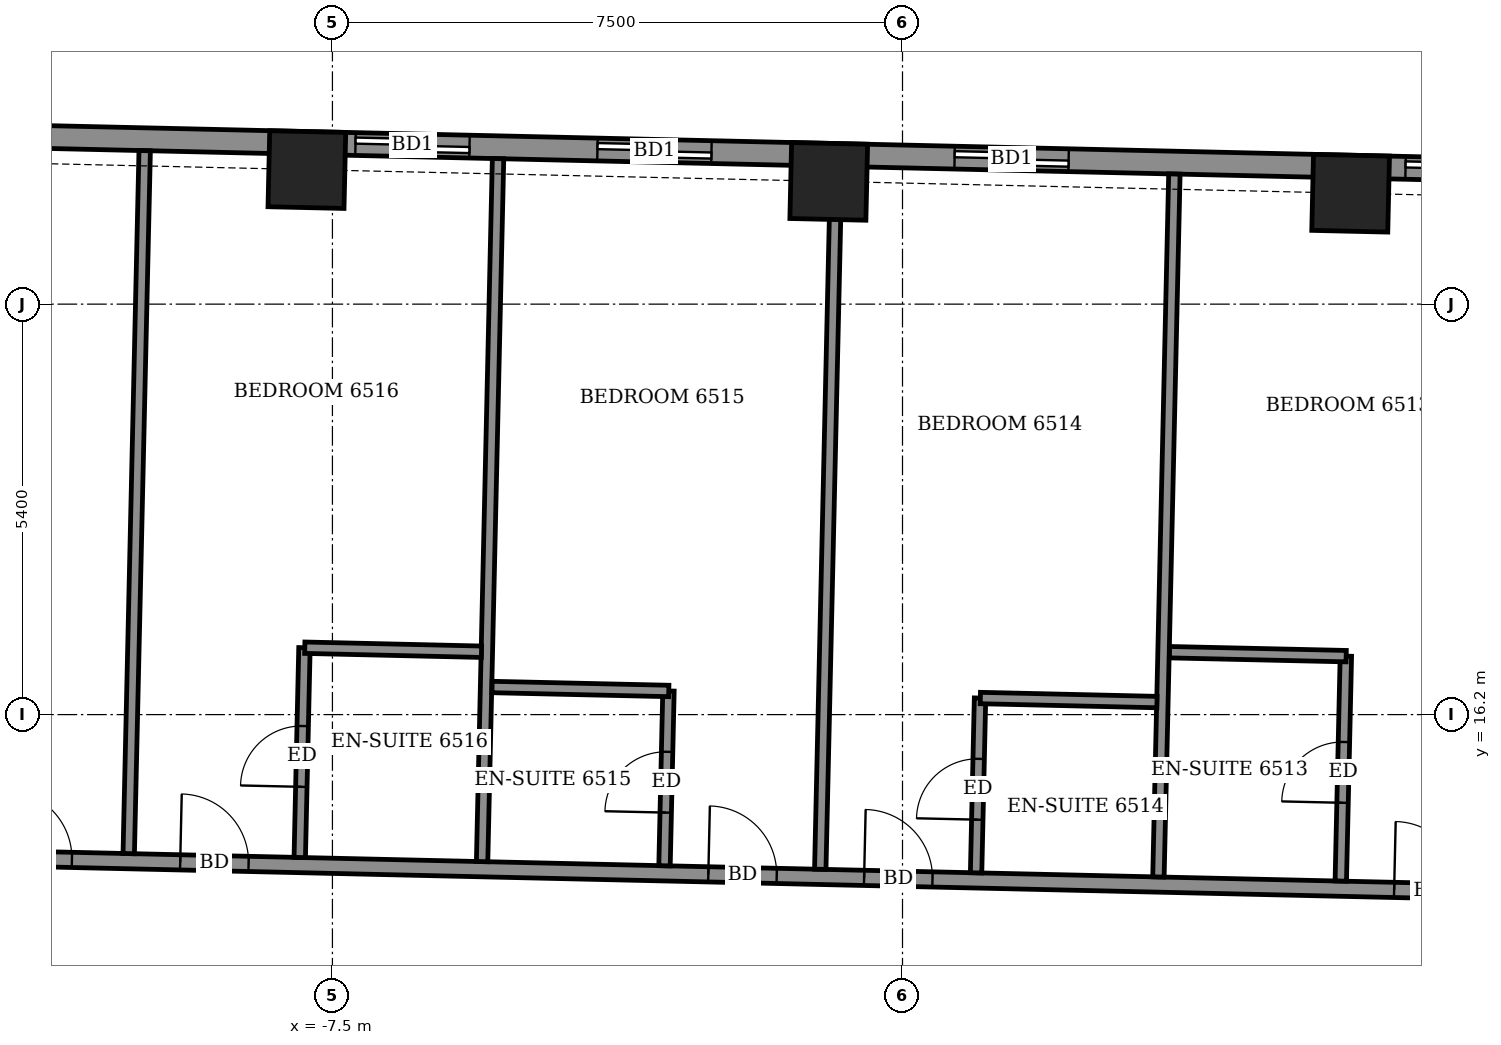
"""IFC4 building model, lengths in metres.
Left out: names, types, materials, properties, quantities, classifications, styles, units other than length and angle.
Written with IfcOpenShell. Run it as: python <this file> out.ifc"""

import sys

from ifc_helpers import new_model, si_unit, direction, frame, frame_2d, origin, origin_2d, place, context, subcontext, project, spatial, rectangle, extrude, element, fill, save


model = new_model("IFC4")
c1 = context("Model", 3, precision=1e-05, world=origin(), true_north=direction((0.0, 1.0)))
c2 = subcontext(c1, "Body", "Model", "MODEL_VIEW")
j1 = project(units=[si_unit("LENGTHUNIT", "METRE"), si_unit("PLANEANGLEUNIT", "RADIAN")], contexts=[c1])
p1 = place(None, origin())
s1 = spatial("IfcSite", under=j1, at=p1, CompositionType="ELEMENT")
p2 = place(p1, origin())
s2 = spatial("IfcBuilding", under=s1, at=p2, CompositionType="ELEMENT")
p3 = place(p2, frame((0.0, 0.0, 257.3)))
s3 = spatial("IfcBuildingStorey", under=s2, at=p3, CompositionType="ELEMENT", Elevation=257.3)
for number, where, z_axis, x_axis in (
    (1, (5.896, 23.059, -0.55), (0.0, 0.0, 1.0), (-1.0, 0.023, 0.0)),
    (2, (-0.97, 23.215, -0.55), (0.0, 0.0, 1.0), (-1.0, 0.023, 0.0)),
    (3, (-7.836, 23.37, -0.55), (0.0, 0.0, 1.0), (-1.0, 0.023, 0.0)),
):
    element("IfcColumn", number, at=place(p3, frame(where, z_axis=z_axis, x_axis=x_axis)), inside=s3, PredefinedType="COLUMN", context=c2, shape_type="SweptSolid", body=[
        extrude(rectangle(XDim=1.0, YDim=1.0, at=origin_2d()), origin(), (0.0, 0.0, 1.0), 3.6),
    ])
p4 = place(p3, frame((26.35, 22.945, 0.0), z_axis=(0.0, 0.0, 1.0), x_axis=(-0.999742523712, 0.022691105788, 0.0)))
e4 = element("IfcWall", 4, at=p4, inside=s3, PredefinedType="SOLIDWALL", context=c2, shape_type="SweptSolid", body=[
    extrude(rectangle(XDim=47.771, YDim=0.3, at=frame_2d((23.886, 0.0))), origin(), (0.0, 0.0, 1.0), 2.55),
])
p5 = place(p4, frame((1.578, 0.0, 0.0)))
e5 = element("IfcOpeningElement", 5, at=p5, cuts=e4, PredefinedType="OPENING", context=c2, shape_type="SweptSolid", body=[
    extrude(rectangle(XDim=1.5, YDim=2.4, at=frame_2d((0.75, 1.2))), frame((0.0, 0.16, 0.0), z_axis=(0.0, -1.0, 0.0), x_axis=(1.0, 0.0, 0.0)), (0.0, 0.0, 1.0), 0.32),
])
p6 = place(p4, frame((4.545, 0.0, 0.0)))
e6 = element("IfcOpeningElement", 6, at=p6, cuts=e4, PredefinedType="OPENING", context=c2, shape_type="SweptSolid", body=[
    extrude(rectangle(XDim=1.5, YDim=2.4, at=frame_2d((0.75, 1.2))), frame((0.0, 0.16, 0.0), z_axis=(0.0, -1.0, 0.0), x_axis=(1.0, 0.0, 0.0)), (0.0, 0.0, 1.0), 0.32),
])
p7 = place(p4, frame((10.354, 0.0, 0.0)))
e7 = element("IfcOpeningElement", 7, at=p7, cuts=e4, PredefinedType="OPENING", context=c2, shape_type="SweptSolid", body=[
    extrude(rectangle(XDim=1.5, YDim=2.4, at=frame_2d((0.75, 1.2))), frame((0.0, 0.16, 0.0), z_axis=(0.0, -1.0, 0.0), x_axis=(1.0, 0.0, 0.0)), (0.0, 0.0, 1.0), 0.32),
])
p8 = place(p4, frame((15.204, 0.0, 0.0)))
e8 = element("IfcOpeningElement", 8, at=p8, cuts=e4, PredefinedType="OPENING", context=c2, shape_type="SweptSolid", body=[
    extrude(rectangle(XDim=1.5, YDim=2.4, at=frame_2d((0.75, 1.2))), frame((0.0, 0.16, 0.0), z_axis=(0.0, -1.0, 0.0), x_axis=(1.0, 0.0, 0.0)), (0.0, 0.0, 1.0), 0.32),
])
p9 = place(p4, frame((18.537, 0.0, 0.0)))
e9 = element("IfcOpeningElement", 9, at=p9, cuts=e4, PredefinedType="OPENING", context=c2, shape_type="SweptSolid", body=[
    extrude(rectangle(XDim=1.2, YDim=2.4, at=frame_2d((0.6, 1.2))), frame((0.0, 0.16, 0.0), z_axis=(0.0, -1.0, 0.0), x_axis=(1.0, 0.0, 0.0)), (0.0, 0.0, 1.0), 0.32),
])
p10 = place(p4, frame((24.171, 0.0, 0.0)))
e10 = element("IfcOpeningElement", 10, at=p10, cuts=e4, PredefinedType="OPENING", context=c2, shape_type="SweptSolid", body=[
    extrude(rectangle(XDim=1.5, YDim=2.4, at=frame_2d((0.75, 1.2))), frame((0.0, 0.16, 0.0), z_axis=(0.0, -1.0, 0.0), x_axis=(1.0, 0.0, 0.0)), (0.0, 0.0, 1.0), 0.32),
])
p11 = place(p4, frame((28.871, 0.0, 0.0)))
e11 = element("IfcOpeningElement", 11, at=p11, cuts=e4, PredefinedType="OPENING", context=c2, shape_type="SweptSolid", body=[
    extrude(rectangle(XDim=1.5, YDim=2.4, at=frame_2d((0.75, 1.2))), frame((0.0, 0.16, 0.0), z_axis=(0.0, -1.0, 0.0), x_axis=(1.0, 0.0, 0.0)), (0.0, 0.0, 1.0), 0.32),
])
p12 = place(p4, frame((32.055, 0.0, 0.0)))
e12 = element("IfcOpeningElement", 12, at=p12, cuts=e4, PredefinedType="OPENING", context=c2, shape_type="SweptSolid", body=[
    extrude(rectangle(XDim=1.5, YDim=2.4, at=frame_2d((0.75, 1.2))), frame((0.0, 0.16, 0.0), z_axis=(0.0, -1.0, 0.0), x_axis=(1.0, 0.0, 0.0)), (0.0, 0.0, 1.0), 0.32),
])
p13 = place(p4, frame((37.813, 0.0, 0.0)))
e13 = element("IfcOpeningElement", 13, at=p13, cuts=e4, PredefinedType="OPENING", context=c2, shape_type="SweptSolid", body=[
    extrude(rectangle(XDim=1.5, YDim=2.4, at=frame_2d((0.75, 1.2))), frame((0.0, 0.16, 0.0), z_axis=(0.0, -1.0, 0.0), x_axis=(1.0, 0.0, 0.0)), (0.0, 0.0, 1.0), 0.32),
])
p14 = place(p4, frame((43.052, 0.0, 0.9)))
e14 = element("IfcOpeningElement", 14, at=p14, cuts=e4, PredefinedType="OPENING", context=c2, shape_type="SweptSolid", body=[
    extrude(rectangle(XDim=2.4, YDim=1.5, at=frame_2d((1.2, 0.75))), frame((0.0, 0.16, 0.0), z_axis=(0.0, -1.0, 0.0), x_axis=(1.0, 0.0, 0.0)), (0.0, 0.0, 1.0), 0.32),
])
p15 = place(p3, frame((-24.474, 14.596, 0.0), z_axis=(0.0, 0.0, 1.0), x_axis=(0.999742424031, -0.022695497208, 0.0)))
e15 = element("IfcWall", 15, at=p15, inside=s3, PredefinedType="PARTITIONING", context=c2, shape_type="SweptSolid", body=[
    extrude(rectangle(XDim=52.872, YDim=0.2, at=frame_2d((26.436, 0.0))), origin(), (0.0, 0.0, 1.0), 3.05),
])
p16 = place(p15, frame((51.336, 0.0, 0.0)))
e16 = element("IfcOpeningElement", 16, at=p16, cuts=e15, PredefinedType="OPENING", context=c2, shape_type="SweptSolid", body=[
    extrude(rectangle(XDim=1.0, YDim=2.1, at=frame_2d((0.5, 1.05))), frame((0.0, 0.11, 0.0), z_axis=(0.0, -1.0, 0.0), x_axis=(1.0, 0.0, 0.0)), (0.0, 0.0, 1.0), 0.22),
])
p17 = place(p15, frame((47.25, 0.0, 0.0)))
e17 = element("IfcOpeningElement", 17, at=p17, cuts=e15, PredefinedType="OPENING", context=c2, shape_type="SweptSolid", body=[
    extrude(rectangle(XDim=0.9, YDim=2.1, at=frame_2d((0.45, 1.05))), frame((0.0, 0.11, 0.0), z_axis=(0.0, -1.0, 0.0), x_axis=(1.0, 0.0, 0.0)), (0.0, 0.0, 1.0), 0.22),
])
p18 = place(p15, frame((42.475, 0.0, 0.0)))
e18 = element("IfcOpeningElement", 18, at=p18, cuts=e15, PredefinedType="OPENING", context=c2, shape_type="SweptSolid", body=[
    extrude(rectangle(XDim=0.9, YDim=2.1, at=frame_2d((0.45, 1.05))), frame((0.0, 0.11, 0.0), z_axis=(0.0, -1.0, 0.0), x_axis=(1.0, 0.0, 0.0)), (0.0, 0.0, 1.0), 0.22),
])
p19 = place(p15, frame((40.15, 0.0, 0.0)))
e19 = element("IfcOpeningElement", 19, at=p19, cuts=e15, PredefinedType="OPENING", context=c2, shape_type="SweptSolid", body=[
    extrude(rectangle(XDim=0.9, YDim=2.1, at=frame_2d((0.45, 1.05))), frame((0.0, 0.11, 0.0), z_axis=(0.0, -1.0, 0.0), x_axis=(1.0, 0.0, 0.0)), (0.0, 0.0, 1.0), 0.22),
])
p20 = place(p15, frame((33.15, 0.0, 0.0)))
e20 = element("IfcOpeningElement", 20, at=p20, cuts=e15, PredefinedType="OPENING", context=c2, shape_type="SweptSolid", body=[
    extrude(rectangle(XDim=0.9, YDim=2.1, at=frame_2d((0.45, 1.05))), frame((0.0, 0.11, 0.0), z_axis=(0.0, -1.0, 0.0), x_axis=(1.0, 0.0, 0.0)), (0.0, 0.0, 1.0), 0.22),
])
p21 = place(p15, frame((30.95, 0.0, 0.0)))
e21 = element("IfcOpeningElement", 21, at=p21, cuts=e15, PredefinedType="OPENING", context=c2, shape_type="SweptSolid", body=[
    extrude(rectangle(XDim=0.9, YDim=2.1, at=frame_2d((0.45, 1.05))), frame((0.0, 0.11, 0.0), z_axis=(0.0, -1.0, 0.0), x_axis=(1.0, 0.0, 0.0)), (0.0, 0.0, 1.0), 0.22),
])
p22 = place(p15, frame((23.975, 0.0, 0.0)))
e22 = element("IfcOpeningElement", 22, at=p22, cuts=e15, PredefinedType="OPENING", context=c2, shape_type="SweptSolid", body=[
    extrude(rectangle(XDim=0.9, YDim=2.1, at=frame_2d((0.45, 1.05))), frame((0.0, 0.11, 0.0), z_axis=(0.0, -1.0, 0.0), x_axis=(1.0, 0.0, 0.0)), (0.0, 0.0, 1.0), 0.22),
])
p23 = place(p15, frame((21.925, 0.0, 0.0)))
e23 = element("IfcOpeningElement", 23, at=p23, cuts=e15, PredefinedType="OPENING", context=c2, shape_type="SweptSolid", body=[
    extrude(rectangle(XDim=0.9, YDim=2.1, at=frame_2d((0.45, 1.05))), frame((0.0, 0.11, 0.0), z_axis=(0.0, -1.0, 0.0), x_axis=(1.0, 0.0, 0.0)), (0.0, 0.0, 1.0), 0.22),
])
p24 = place(p15, frame((14.975, 0.0, 0.0)))
e24 = element("IfcOpeningElement", 24, at=p24, cuts=e15, PredefinedType="OPENING", context=c2, shape_type="SweptSolid", body=[
    extrude(rectangle(XDim=0.9, YDim=2.1, at=frame_2d((0.45, 1.05))), frame((0.0, 0.11, 0.0), z_axis=(0.0, -1.0, 0.0), x_axis=(1.0, 0.0, 0.0)), (0.0, 0.0, 1.0), 0.22),
])
p25 = place(p15, frame((12.65, 0.0, 0.0)))
e25 = element("IfcOpeningElement", 25, at=p25, cuts=e15, PredefinedType="OPENING", context=c2, shape_type="SweptSolid", body=[
    extrude(rectangle(XDim=0.9, YDim=2.1, at=frame_2d((0.45, 1.05))), frame((0.0, 0.11, 0.0), z_axis=(0.0, -1.0, 0.0), x_axis=(1.0, 0.0, 0.0)), (0.0, 0.0, 1.0), 0.22),
])
p26 = place(p15, frame((2.0, 0.0, 0.0)))
e26 = element("IfcOpeningElement", 26, at=p26, cuts=e15, PredefinedType="OPENING", context=c2, shape_type="SweptSolid", body=[
    extrude(rectangle(XDim=1.0, YDim=2.1, at=frame_2d((0.5, 1.05))), frame((0.0, 0.11, 0.0), z_axis=(0.0, -1.0, 0.0), x_axis=(1.0, 0.0, 0.0)), (0.0, 0.0, 1.0), 0.22),
])
p27 = place(p15, frame((7.75, 0.0, 0.0)))
e27 = element("IfcOpeningElement", 27, at=p27, cuts=e15, PredefinedType="OPENING", context=c2, shape_type="SweptSolid", body=[
    extrude(rectangle(XDim=0.9, YDim=2.1, at=frame_2d((0.45, 1.05))), frame((0.0, 0.11, 0.0), z_axis=(0.0, -1.0, 0.0), x_axis=(1.0, 0.0, 0.0)), (0.0, 0.0, 1.0), 0.22),
])
p28 = place(p3, frame((-10.18, 14.371, 0.0), z_axis=(0.0, 0.0, 1.0), x_axis=(0.022698023584, 0.999742366675, 0.0)))
e28 = element("IfcWall", 28, at=p28, inside=s3, PredefinedType="PARTITIONING", context=c2, shape_type="SweptSolid", body=[
    extrude(rectangle(XDim=9.25, YDim=0.15, at=frame_2d((4.625, 0.0))), origin(), (0.0, 0.0, 1.0), 2.55),
])
p29 = place(p3, frame((-7.93, 14.32, 0.0), z_axis=(0.0, 0.0, 1.0), x_axis=(0.022462265691, 0.99974769148, 0.0)))
e29 = element("IfcWall", 29, at=p29, inside=s3, PredefinedType="PARTITIONING", context=c2, shape_type="SweptSolid", body=[
    extrude(rectangle(XDim=2.761, YDim=0.15, at=frame_2d((1.38, 0.0))), origin(), (0.0, 0.0, 1.0), 3.05),
])
p30 = place(p29, frame((0.93, 0.0, 0.0)))
e30 = element("IfcOpeningElement", 30, at=p30, cuts=e29, PredefinedType="OPENING", context=c2, shape_type="SweptSolid", body=[
    extrude(rectangle(XDim=0.8, YDim=2.1, at=frame_2d((0.4, 1.05))), frame((0.0, 0.085, 0.0), z_axis=(0.0, -1.0, 0.0), x_axis=(1.0, 0.0, 0.0)), (0.0, 0.0, 1.0), 0.17),
])
p31 = place(p3, frame((-5.531, 14.266, 0.0), z_axis=(0.0, 0.0, 1.0), x_axis=(0.022698023584, 0.999742366675, 0.0)))
e31 = element("IfcWall", 31, at=p31, inside=s3, PredefinedType="PARTITIONING", context=c2, shape_type="SweptSolid", body=[
    extrude(rectangle(XDim=9.25, YDim=0.15, at=frame_2d((4.625, 0.0))), origin(), (0.0, 0.0, 1.0), 2.55),
])
p32 = place(p3, frame((-3.131, 14.211, 0.0), z_axis=(0.0, 0.0, 1.0), x_axis=(0.022603288534, 0.999744513037, 0.0)))
e32 = element("IfcWall", 32, at=p32, inside=s3, PredefinedType="PARTITIONING", context=c2, shape_type="SweptSolid", body=[
    extrude(rectangle(XDim=2.301, YDim=0.15, at=frame_2d((1.15, 0.0))), origin(), (0.0, 0.0, 1.0), 3.05),
])
p33 = place(p32, frame((0.7, 0.0, 0.0)))
e33 = element("IfcOpeningElement", 33, at=p33, cuts=e32, PredefinedType="OPENING", context=c2, shape_type="SweptSolid", body=[
    extrude(rectangle(XDim=0.8, YDim=2.1, at=frame_2d((0.4, 1.05))), frame((0.0, 0.085, 0.0), z_axis=(0.0, -1.0, 0.0), x_axis=(1.0, 0.0, 0.0)), (0.0, 0.0, 1.0), 0.17),
])
p34 = place(p3, frame((-1.082, 14.165, 0.0), z_axis=(0.0, 0.0, 1.0), x_axis=(0.022697424684, 0.999742380272, 0.0)))
e34 = element("IfcWall", 34, at=p34, inside=s3, PredefinedType="PARTITIONING", context=c2, shape_type="SweptSolid", body=[
    extrude(rectangle(XDim=9.25, YDim=0.15, at=frame_2d((4.625, 0.0))), origin(), (0.0, 0.0, 1.0), 3.05),
])
p35 = place(p3, frame((0.968, 14.118, 0.0), z_axis=(0.0, 0.0, 1.0), x_axis=(0.022603288534, 0.999744513037, 0.0)))
e35 = element("IfcWall", 35, at=p35, inside=s3, PredefinedType="PARTITIONING", context=c2, shape_type="SweptSolid", body=[
    extrude(rectangle(XDim=2.301, YDim=0.15, at=frame_2d((1.15, 0.0))), origin(), (0.0, 0.0, 1.0), 3.05),
])
p36 = place(p35, frame((0.7, 0.0, 0.0)))
e36 = element("IfcOpeningElement", 36, at=p36, cuts=e35, PredefinedType="OPENING", context=c2, shape_type="SweptSolid", body=[
    extrude(rectangle(XDim=0.8, YDim=2.1, at=frame_2d((0.4, 1.05))), frame((0.0, 0.085, 0.0), z_axis=(0.0, -1.0, 0.0), x_axis=(1.0, 0.0, 0.0)), (0.0, 0.0, 1.0), 0.17),
])
p37 = place(p3, frame((3.367, 14.064, 0.0), z_axis=(0.0, 0.0, 1.0), x_axis=(0.022697424684, 0.999742380272, 0.0)))
e37 = element("IfcWall", 37, at=p37, inside=s3, PredefinedType="PARTITIONING", context=c2, shape_type="SweptSolid", body=[
    extrude(rectangle(XDim=9.25, YDim=0.15, at=frame_2d((4.625, 0.0))), origin(), (0.0, 0.0, 1.0), 2.55),
])
p38 = place(p3, frame((5.766, 14.01, 0.0), z_axis=(0.0, 0.0, 1.0), x_axis=(0.022601485787, 0.999744553794, 0.0)))
e38 = element("IfcWall", 38, at=p38, inside=s3, PredefinedType="PARTITIONING", context=c2, shape_type="SweptSolid", body=[
    extrude(rectangle(XDim=2.96, YDim=0.15, at=frame_2d((1.48, 0.0))), origin(), (0.0, 0.0, 1.0), 3.05),
])
p39 = place(p38, frame((1.03, 0.0, 0.0)))
e39 = element("IfcOpeningElement", 39, at=p39, cuts=e38, PredefinedType="OPENING", context=c2, shape_type="SweptSolid", body=[
    extrude(rectangle(XDim=0.8, YDim=2.1, at=frame_2d((0.4, 1.05))), frame((0.0, 0.085, 0.0), z_axis=(0.0, -1.0, 0.0), x_axis=(1.0, 0.0, 0.0)), (0.0, 0.0, 1.0), 0.17),
])
p40 = place(p3, frame((-5.4, 16.563, 0.0), z_axis=(0.0, 0.0, 1.0), x_axis=(0.999749954681, -0.022361308448, 0.0)))
e40 = element("IfcWall", 40, at=p40, inside=s3, PredefinedType="PARTITIONING", context=c2, shape_type="SweptSolid", body=[
    extrude(rectangle(XDim=2.325, YDim=0.15, at=frame_2d((1.163, 0.0))), origin(), (0.0, 0.0, 1.0), 3.05),
])
p41 = place(p3, frame((1.024, 16.418, 0.0), z_axis=(0.0, 0.0, 1.0), x_axis=(0.999740260747, -0.02279059109, 0.0)))
e41 = element("IfcWall", 41, at=p41, inside=s3, PredefinedType="PARTITIONING", context=c2, shape_type="SweptSolid", body=[
    extrude(rectangle(XDim=2.324, YDim=0.15, at=frame_2d((1.162, 0.0))), origin(), (0.0, 0.0, 1.0), 3.05),
])
p42 = place(p3, frame((-7.864, 17.08, 0.0), z_axis=(0.0, 0.0, 1.0), x_axis=(0.999740478815, -0.022781023197, 0.0)))
e42 = element("IfcWall", 42, at=p42, inside=s3, PredefinedType="PARTITIONING", context=c2, shape_type="SweptSolid", body=[
    extrude(rectangle(XDim=2.325, YDim=0.15, at=frame_2d((1.163, 0.0))), origin(), (0.0, 0.0, 1.0), 3.05),
])
p43 = place(p3, frame((3.513, 17.021, 0.0), z_axis=(0.0, 0.0, 1.0), x_axis=(0.999749744571, -0.022370700241, 0.0)))
e43 = element("IfcWall", 43, at=p43, inside=s3, PredefinedType="PARTITIONING", context=c2, shape_type="SweptSolid", body=[
    extrude(rectangle(XDim=2.324, YDim=0.15, at=frame_2d((1.162, 0.0))), origin(), (0.0, 0.0, 1.0), 3.05),
])
p44 = place(p9, origin())
e44 = element("IfcDoor", 44, at=p44, inside=s3, OperationType="SLIDING_TO_LEFT", PredefinedType="DOOR", context=c2, shape_type="SweptSolid", body=[
    extrude(rectangle(XDim=1.2, YDim=2.4, at=frame_2d((0.6, 1.2))), frame((0.0, 0.025, 0.0), z_axis=(0.0, -1.0, 0.0), x_axis=(1.0, 0.0, 0.0)), (0.0, 0.0, 1.0), 0.05),
])
fill(e9, e44)
p45 = place(p10, origin())
e45 = element("IfcDoor", 45, at=p45, inside=s3, OperationType="SLIDING_TO_LEFT", PredefinedType="DOOR", context=c2, shape_type="SweptSolid", body=[
    extrude(rectangle(XDim=1.5, YDim=2.4, at=frame_2d((0.75, 1.2))), frame((0.0, 0.025, 0.0), z_axis=(0.0, -1.0, 0.0), x_axis=(1.0, 0.0, 0.0)), (0.0, 0.0, 1.0), 0.05),
])
fill(e10, e45)
p46 = place(p11, origin())
e46 = element("IfcDoor", 46, at=p46, inside=s3, OperationType="SLIDING_TO_LEFT", PredefinedType="DOOR", context=c2, shape_type="SweptSolid", body=[
    extrude(rectangle(XDim=1.5, YDim=2.4, at=frame_2d((0.75, 1.2))), frame((0.0, 0.025, 0.0), z_axis=(0.0, -1.0, 0.0), x_axis=(1.0, 0.0, 0.0)), (0.0, 0.0, 1.0), 0.05),
])
fill(e11, e46)
p47 = place(p12, origin())
e47 = element("IfcDoor", 47, at=p47, inside=s3, OperationType="SLIDING_TO_LEFT", PredefinedType="DOOR", context=c2, shape_type="SweptSolid", body=[
    extrude(rectangle(XDim=1.5, YDim=2.4, at=frame_2d((0.75, 1.2))), frame((0.0, 0.025, 0.0), z_axis=(0.0, -1.0, 0.0), x_axis=(1.0, 0.0, 0.0)), (0.0, 0.0, 1.0), 0.05),
])
fill(e12, e47)
p48 = place(p21, origin())
e48 = element("IfcDoor", 48, at=p48, inside=s3, OperationType="SINGLE_SWING_LEFT", PredefinedType="DOOR", context=c2, shape_type="SweptSolid", body=[
    extrude(rectangle(XDim=0.9, YDim=2.1, at=frame_2d((0.45, 1.05))), frame((0.0, 0.025, 0.0), z_axis=(0.0, -1.0, 0.0), x_axis=(1.0, 0.0, 0.0)), (0.0, 0.0, 1.0), 0.05),
])
fill(e21, e48)
p49 = place(p39, origin())
e49 = element("IfcDoor", 49, at=p49, inside=s3, OperationType="SINGLE_SWING_LEFT", PredefinedType="DOOR", context=c2, shape_type="SweptSolid", body=[
    extrude(rectangle(XDim=0.8, YDim=2.1, at=frame_2d((0.4, 1.05))), frame((0.0, 0.025, 0.0), z_axis=(0.0, -1.0, 0.0), x_axis=(1.0, 0.0, 0.0)), (0.0, 0.0, 1.0), 0.05),
])
fill(e39, e49)
p50 = place(p22, origin())
e50 = element("IfcDoor", 50, at=p50, inside=s3, OperationType="SINGLE_SWING_RIGHT", PredefinedType="DOOR", context=c2, shape_type="SweptSolid", body=[
    extrude(rectangle(XDim=0.9, YDim=2.1, at=frame_2d((0.45, 1.05))), frame((0.0, 0.025, 0.0), z_axis=(0.0, -1.0, 0.0), x_axis=(1.0, 0.0, 0.0)), (0.0, 0.0, 1.0), 0.05),
])
fill(e22, e50)
p51 = place(p36, origin())
e51 = element("IfcDoor", 51, at=p51, inside=s3, OperationType="SINGLE_SWING_RIGHT", PredefinedType="DOOR", context=c2, shape_type="SweptSolid", body=[
    extrude(rectangle(XDim=0.8, YDim=2.1, at=frame_2d((0.4, 1.05))), frame((0.0, 0.025, 0.0), z_axis=(0.0, -1.0, 0.0), x_axis=(1.0, 0.0, 0.0)), (0.0, 0.0, 1.0), 0.05),
])
fill(e36, e51)
p52 = place(p23, origin())
e52 = element("IfcDoor", 52, at=p52, inside=s3, OperationType="SINGLE_SWING_LEFT", PredefinedType="DOOR", context=c2, shape_type="SweptSolid", body=[
    extrude(rectangle(XDim=0.9, YDim=2.1, at=frame_2d((0.45, 1.05))), frame((0.0, 0.025, 0.0), z_axis=(0.0, -1.0, 0.0), x_axis=(1.0, 0.0, 0.0)), (0.0, 0.0, 1.0), 0.05),
])
fill(e23, e52)
p53 = place(p33, origin())
e53 = element("IfcDoor", 53, at=p53, inside=s3, OperationType="SINGLE_SWING_LEFT", PredefinedType="DOOR", context=c2, shape_type="SweptSolid", body=[
    extrude(rectangle(XDim=0.8, YDim=2.1, at=frame_2d((0.4, 1.05))), frame((0.0, 0.025, 0.0), z_axis=(0.0, -1.0, 0.0), x_axis=(1.0, 0.0, 0.0)), (0.0, 0.0, 1.0), 0.05),
])
fill(e33, e53)
p54 = place(p24, origin())
e54 = element("IfcDoor", 54, at=p54, inside=s3, OperationType="SINGLE_SWING_RIGHT", PredefinedType="DOOR", context=c2, shape_type="SweptSolid", body=[
    extrude(rectangle(XDim=0.9, YDim=2.1, at=frame_2d((0.45, 1.05))), frame((0.0, 0.025, 0.0), z_axis=(0.0, -1.0, 0.0), x_axis=(1.0, 0.0, 0.0)), (0.0, 0.0, 1.0), 0.05),
])
fill(e24, e54)
p55 = place(p30, origin())
e55 = element("IfcDoor", 55, at=p55, inside=s3, OperationType="SINGLE_SWING_RIGHT", PredefinedType="DOOR", context=c2, shape_type="SweptSolid", body=[
    extrude(rectangle(XDim=0.8, YDim=2.1, at=frame_2d((0.4, 1.05))), frame((0.0, 0.025, 0.0), z_axis=(0.0, -1.0, 0.0), x_axis=(1.0, 0.0, 0.0)), (0.0, 0.0, 1.0), 0.05),
])
fill(e30, e55)
p56 = place(p25, origin())
e56 = element("IfcDoor", 56, at=p56, inside=s3, OperationType="SINGLE_SWING_LEFT", PredefinedType="DOOR", context=c2, shape_type="SweptSolid", body=[
    extrude(rectangle(XDim=0.9, YDim=2.1, at=frame_2d((0.45, 1.05))), frame((0.0, 0.025, 0.0), z_axis=(0.0, -1.0, 0.0), x_axis=(1.0, 0.0, 0.0)), (0.0, 0.0, 1.0), 0.05),
])
fill(e25, e56)
save(model, sys.argv[1])
